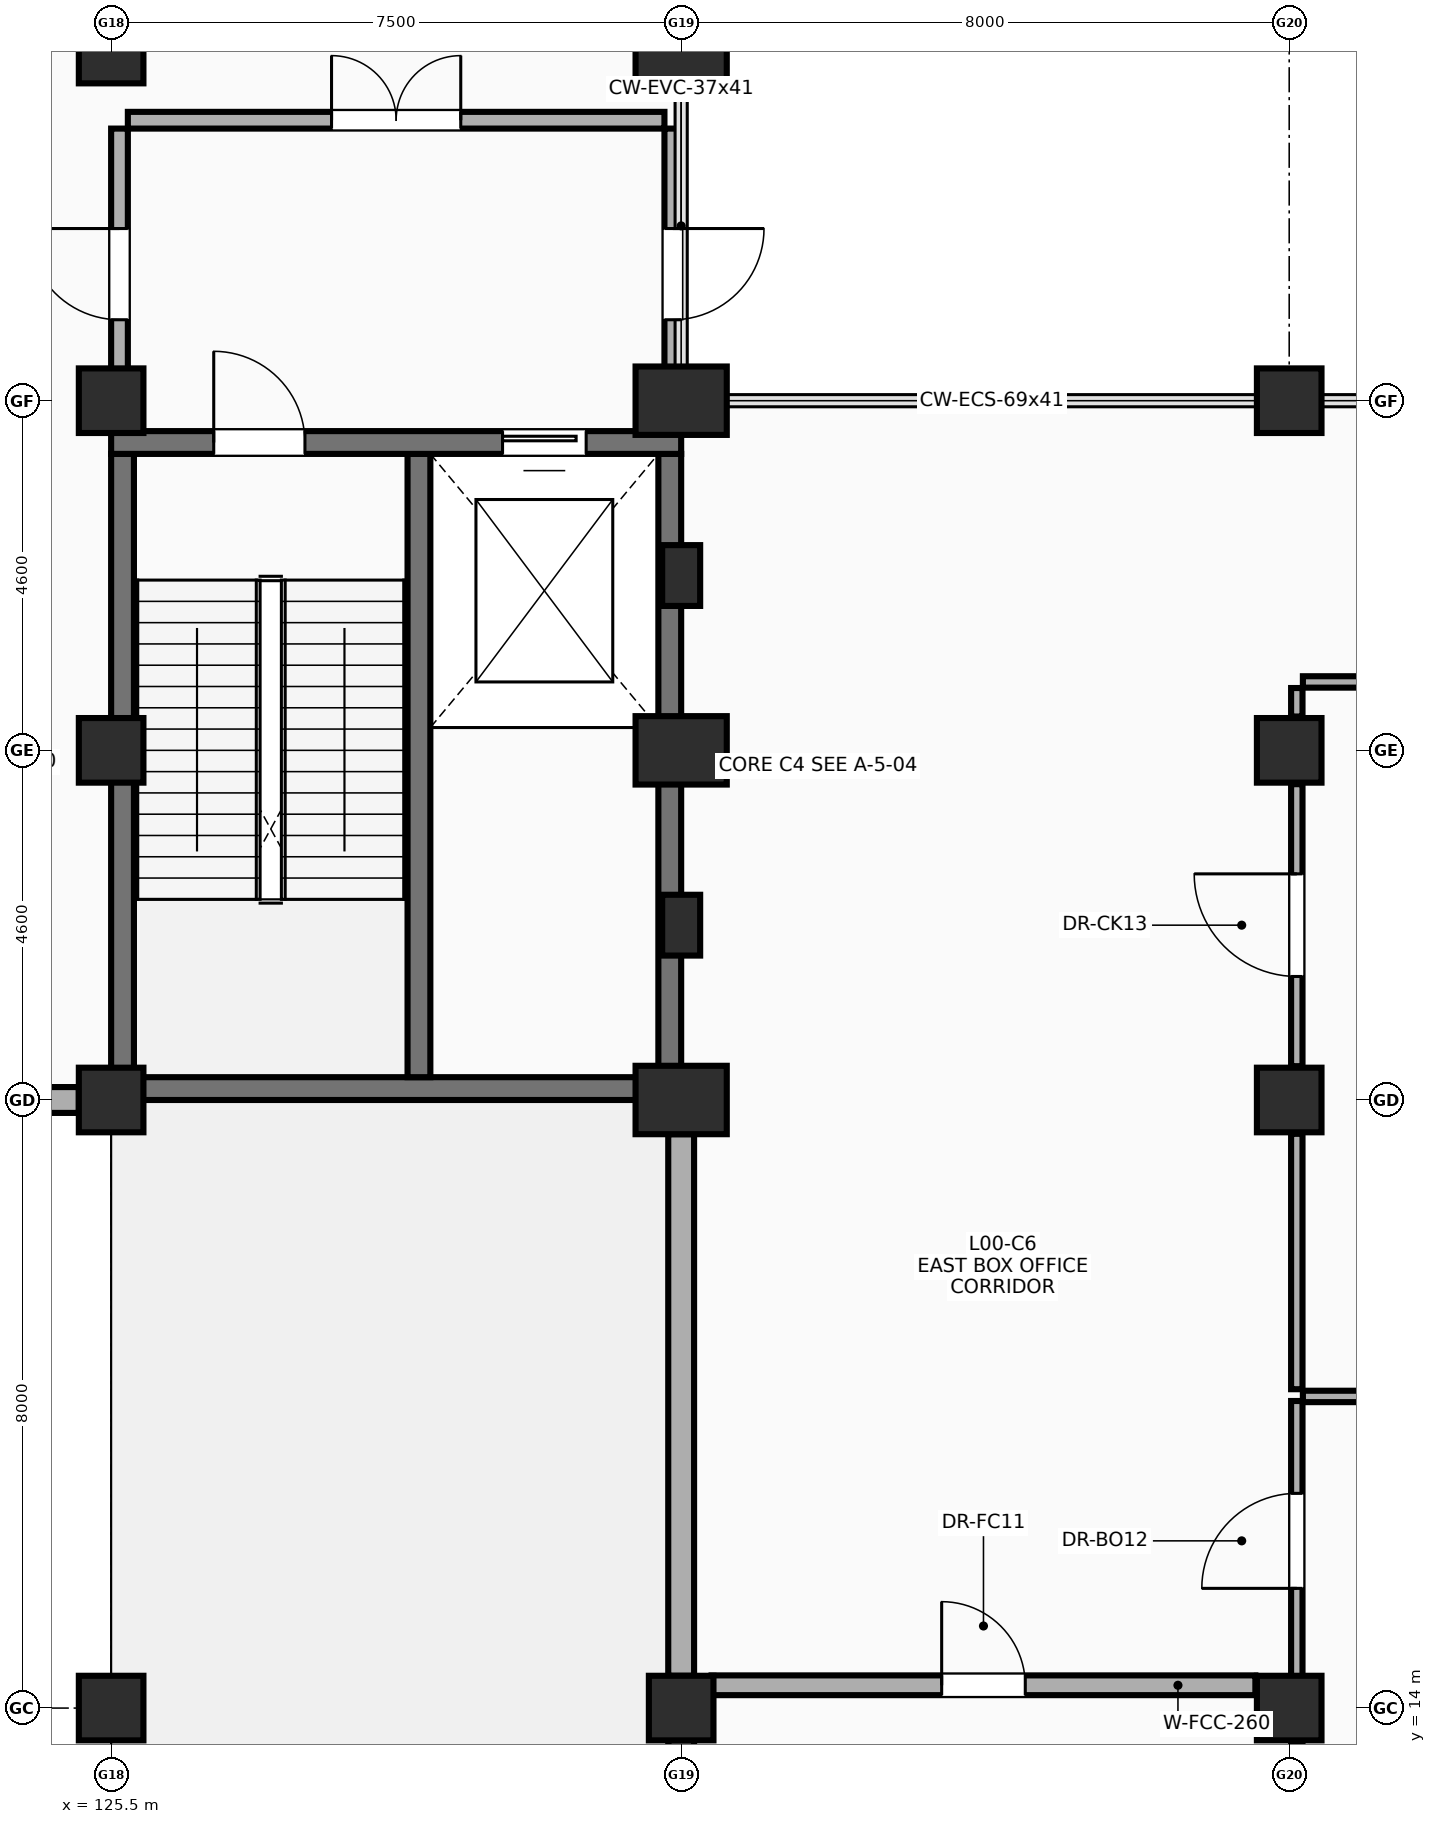
"""IFC4 building model, lengths in metres.
Left out: names, types, materials, properties, quantities, classifications, styles, units other than length and angle.
Written with IfcOpenShell. Run it as: python <this file> out.ifc"""

import sys

from ifc_helpers import new_model, si_unit, direction, frame, frame_2d, origin, origin_2d, place, context, subcontext, project, spatial, rectangle, circle, extrude, element, fill, save


model = new_model("IFC4")
c1 = context("Model", 3, precision=1e-05, world=origin(), true_north=direction((0.0, 1.0)))
c2 = subcontext(c1, "Body", "Model", "MODEL_VIEW")
j1 = project(units=[si_unit("LENGTHUNIT", "METRE"), si_unit("PLANEANGLEUNIT", "RADIAN")], contexts=[c1])
p1 = place(None, origin())
s1 = spatial("IfcSite", under=j1, at=p1, CompositionType="ELEMENT")
p2 = place(p1, origin())
s2 = spatial("IfcBuilding", under=s1, at=p2, CompositionType="ELEMENT")
p3 = place(p2, origin())
s3 = spatial("IfcBuildingStorey", under=s2, at=p3, CompositionType="ELEMENT", Elevation=0.0)
p4 = place(p3, frame((125.5, 14.0, 0.0), z_axis=(0.0, 0.0, 1.0), x_axis=(1.0, 0.0, 0.0)))
e1 = element("IfcColumn", 1, at=p4, inside=s3, PredefinedType="COLUMN", context=c2, shape_type="SweptSolid", body=[
    extrude(circle(Radius=0.425, at=origin_2d()), origin(), (0.0, 0.0, 1.0), 5.4),
])
for number, where, z_axis, x_axis in (
    (2, (125.5, 22.0, 0.0), (0.0, 0.0, 1.0), (1.0, 0.0, 0.0)),
    (3, (125.5, 26.6, 0.0), (0.0, 0.0, 1.0), (1.0, 0.0, 0.0)),
    (4, (125.5, 31.2, 0.0), (0.0, 0.0, 1.0), (1.0, 0.0, 0.0)),
    (5, (125.5, 35.8, 0.0), (0.0, 0.0, 1.0), (1.0, 0.0, 0.0)),
    (6, (133.0, 14.0, 0.0), (0.0, 0.0, 1.0), (1.0, 0.0, 0.0)),
):
    element("IfcColumn", number, at=place(p3, frame(where, z_axis=z_axis, x_axis=x_axis)), inside=s3, PredefinedType="COLUMN", context=c2, shape_type="SweptSolid", body=[
        extrude(rectangle(XDim=0.85, YDim=0.85, at=origin_2d()), origin(), (0.0, 0.0, 1.0), 5.4),
    ])
for number, where, z_axis, x_axis in (
    (7, (133.0, 22.0, 0.0), (0.0, 0.0, 1.0), (1.0, 0.0, 0.0)),
    (8, (133.0, 26.6, 0.0), (0.0, 0.0, 1.0), (1.0, 0.0, 0.0)),
    (9, (133.0, 31.2, 0.0), (0.0, 0.0, 1.0), (1.0, 0.0, 0.0)),
    (10, (133.0, 35.8, 0.0), (0.0, 0.0, 1.0), (1.0, 0.0, 0.0)),
):
    element("IfcColumn", number, at=place(p3, frame(where, z_axis=z_axis, x_axis=x_axis)), inside=s3, PredefinedType="COLUMN", context=c2, shape_type="SweptSolid", body=[
        extrude(rectangle(XDim=1.2, YDim=0.9, at=origin_2d()), origin(), (0.0, 0.0, 1.0), 5.4),
    ])
for number, where, z_axis, x_axis in (
    (11, (141.0, 14.0, 0.0), (0.0, 0.0, 1.0), (1.0, 0.0, 0.0)),
    (12, (141.0, 22.0, 0.0), (0.0, 0.0, 1.0), (1.0, 0.0, 0.0)),
    (13, (141.0, 26.6, 0.0), (0.0, 0.0, 1.0), (1.0, 0.0, 0.0)),
    (14, (141.0, 31.2, 0.0), (0.0, 0.0, 1.0), (1.0, 0.0, 0.0)),
):
    element("IfcColumn", number, at=place(p3, frame(where, z_axis=z_axis, x_axis=x_axis)), inside=s3, PredefinedType="COLUMN", context=c2, shape_type="SweptSolid", body=[
        extrude(rectangle(XDim=0.85, YDim=0.85, at=origin_2d()), origin(), (0.0, 0.0, 1.0), 5.4),
    ])
for number, where, z_axis, x_axis in (
    (15, (133.0, 24.3, 0.0), (0.0, 0.0, 1.0), (1.0, 0.0, 0.0)),
    (16, (133.0, 28.9, 0.0), (0.0, 0.0, 1.0), (1.0, 0.0, 0.0)),
):
    element("IfcColumn", number, at=place(p3, frame(where, z_axis=z_axis, x_axis=x_axis)), inside=s3, PredefinedType="PILASTER", context=c2, shape_type="SweptSolid", body=[
        extrude(rectangle(XDim=0.5, YDim=0.8, at=origin_2d()), origin(), (0.0, 0.0, 1.0), 5.4),
    ])
p5 = place(p3, frame((125.5, 22.15, 0.0), z_axis=(0.0, 0.0, 1.0), x_axis=(1.0, 0.0, 0.0)))
e17 = element("IfcWall", 17, at=p5, inside=s3, PredefinedType="SHEAR", context=c2, shape_type="SweptSolid", body=[
    extrude(rectangle(XDim=7.5, YDim=0.3, at=frame_2d((3.75, 0.0))), origin(), (0.0, 0.0, 1.0), 5.4),
])
for number, where, z_axis, x_axis in (
    (18, (125.65, 22.3, 0.0), (0.0, 0.0, 1.0), (0.0, 1.0, 0.0)),
    (19, (132.85, 22.3, 0.0), (0.0, 0.0, 1.0), (0.0, 1.0, 0.0)),
    (20, (129.55, 22.3, 0.0), (0.0, 0.0, 1.0), (0.0, 1.0, 0.0)),
):
    element("IfcWall", number, at=place(p3, frame(where, z_axis=z_axis, x_axis=x_axis)), inside=s3, PredefinedType="SHEAR", context=c2, shape_type="SweptSolid", body=[
        extrude(rectangle(XDim=8.2, YDim=0.3, at=frame_2d((4.1, 0.0))), origin(), (0.0, 0.0, 1.0), 5.4),
    ])
p6 = place(p3, frame((133.0, 6.425, 0.0), z_axis=(0.0, 0.0, 1.0), x_axis=(0.0, 1.0, 0.0)))
e21 = element("IfcWall", 21, at=p6, inside=s3, PredefinedType="SOLIDWALL", context=c2, shape_type="SweptSolid", body=[
    extrude(rectangle(XDim=7.15, YDim=0.34, at=frame_2d((3.575, 0.0))), origin(), (0.0, 0.0, 1.0), 4.15),
])
p7 = place(p3, frame((133.0, 14.425, 0.0), z_axis=(0.0, 0.0, 1.0), x_axis=(0.0, 1.0, 0.0)))
e22 = element("IfcWall", 22, at=p7, inside=s3, PredefinedType="SOLIDWALL", context=c2, shape_type="SweptSolid", body=[
    extrude(rectangle(XDim=7.125, YDim=0.34, at=frame_2d((3.562, 0.0))), origin(), (0.0, 0.0, 1.0), 4.15),
])
p8 = place(p3, frame((125.5, 30.65, 0.0), z_axis=(0.0, 0.0, 1.0), x_axis=(1.0, 0.0, 0.0)))
e23 = element("IfcWall", 23, at=p8, inside=s3, PredefinedType="SHEAR", context=c2, shape_type="SweptSolid", body=[
    extrude(rectangle(XDim=7.5, YDim=0.3, at=frame_2d((3.75, 0.0))), origin(), (0.0, 0.0, 1.0), 5.4),
])
p9 = place(p8, frame((1.35, 0.0, 0.0)))
e24 = element("IfcOpeningElement", 24, at=p9, cuts=e23, PredefinedType="OPENING", context=c2, shape_type="SweptSolid", body=[
    extrude(rectangle(XDim=1.2, YDim=2.15, at=frame_2d((0.6, 1.075))), frame((0.0, 0.16, 0.0), z_axis=(0.0, -1.0, 0.0), x_axis=(1.0, 0.0, 0.0)), (0.0, 0.0, 1.0), 0.32),
])
p10 = place(p8, frame((5.15, 0.0, 0.0)))
e25 = element("IfcOpeningElement", 25, at=p10, cuts=e23, PredefinedType="OPENING", context=c2, shape_type="SweptSolid", body=[
    extrude(rectangle(XDim=1.1, YDim=2.15, at=frame_2d((0.55, 1.075))), frame((0.0, 0.16, 0.0), z_axis=(0.0, -1.0, 0.0), x_axis=(1.0, 0.0, 0.0)), (0.0, 0.0, 1.0), 0.32),
])
p11 = place(p3, frame((125.72, 34.89, 0.0), z_axis=(0.0, 0.0, 1.0), x_axis=(1.0, 0.0, 0.0)))
e26 = element("IfcWall", 26, at=p11, inside=s3, PredefinedType="SOLIDWALL", context=c2, shape_type="SweptSolid", body=[
    extrude(rectangle(XDim=7.06, YDim=0.22, at=frame_2d((3.53, 0.0))), origin(), (0.0, 0.0, 1.0), 4.4),
])
p12 = place(p11, frame((2.68, 0.0, 0.0)))
e27 = element("IfcOpeningElement", 27, at=p12, cuts=e26, PredefinedType="OPENING", context=c2, shape_type="SweptSolid", body=[
    extrude(rectangle(XDim=1.7, YDim=2.18, at=frame_2d((0.85, 1.09))), frame((0.0, 0.12, 0.0), z_axis=(0.0, -1.0, 0.0), x_axis=(1.0, 0.0, 0.0)), (0.0, 0.0, 1.0), 0.24),
])
p13 = place(p3, frame((125.61, 30.95, 0.0), z_axis=(0.0, 0.0, 1.0), x_axis=(0.0, 1.0, 0.0)))
e28 = element("IfcWall", 28, at=p13, inside=s3, PredefinedType="SOLIDWALL", context=c2, shape_type="SweptSolid", body=[
    extrude(rectangle(XDim=3.83, YDim=0.22, at=frame_2d((1.915, 0.0))), origin(), (0.0, 0.0, 1.0), 4.2),
])
p14 = place(p13, frame((1.315, 0.0, 0.0)))
e29 = element("IfcOpeningElement", 29, at=p14, cuts=e28, PredefinedType="OPENING", context=c2, shape_type="SweptSolid", body=[
    extrude(rectangle(XDim=1.2, YDim=2.15, at=frame_2d((0.6, 1.075))), frame((0.0, 0.12, 0.0), z_axis=(0.0, -1.0, 0.0), x_axis=(1.0, 0.0, 0.0)), (0.0, 0.0, 1.0), 0.24),
])
p15 = place(p3, frame((132.89, 30.95, 0.0), z_axis=(0.0, 0.0, 1.0), x_axis=(0.0, 1.0, 0.0)))
e30 = element("IfcWall", 30, at=p15, inside=s3, PredefinedType="SOLIDWALL", context=c2, shape_type="SweptSolid", body=[
    extrude(rectangle(XDim=3.83, YDim=0.22, at=frame_2d((1.915, 0.0))), origin(), (0.0, 0.0, 1.0), 4.4),
])
p16 = place(p15, frame((2.515, 0.0, 0.0), z_axis=(0.0, 0.0, 1.0), x_axis=(-1.0, 0.0, 0.0)))
e31 = element("IfcOpeningElement", 31, at=p16, cuts=e30, PredefinedType="OPENING", context=c2, shape_type="SweptSolid", body=[
    extrude(rectangle(XDim=1.2, YDim=2.15, at=frame_2d((0.6, 1.075))), frame((0.0, 0.12, 0.0), z_axis=(0.0, -1.0, 0.0), x_axis=(1.0, 0.0, 0.0)), (0.0, 0.0, 1.0), 0.24),
])
p17 = place(p3, frame((141.18, 18.1, 0.0), z_axis=(0.0, 0.0, 1.0), x_axis=(1.0, 0.0, 0.0)))
e32 = element("IfcWall", 32, at=p17, inside=s3, PredefinedType="PARTITIONING", context=c2, shape_type="SweptSolid", body=[
    extrude(rectangle(XDim=15.82, YDim=0.15, at=frame_2d((7.91, 0.0))), origin(), (0.0, 0.0, 1.0), 3.9),
])
p18 = place(p3, frame((141.1, 6.4, 0.0), z_axis=(0.0, 0.0, 1.0), x_axis=(0.0, 1.0, 0.0)))
e33 = element("IfcWall", 33, at=p18, inside=s3, PredefinedType="PARTITIONING", context=c2, shape_type="SweptSolid", body=[
    extrude(rectangle(XDim=7.155, YDim=0.15, at=frame_2d((3.578, 0.0))), origin(), (0.0, 0.0, 1.0), 4.2),
])
p19 = place(p3, frame((141.1, 14.4, 0.0), z_axis=(0.0, 0.0, 1.0), x_axis=(0.0, 1.0, 0.0)))
e34 = element("IfcWall", 34, at=p19, inside=s3, PredefinedType="PARTITIONING", context=c2, shape_type="SweptSolid", body=[
    extrude(rectangle(XDim=3.64, YDim=0.15, at=frame_2d((1.82, 0.0))), origin(), (0.0, 0.0, 1.0), 4.2),
])
p20 = place(p19, frame((1.175, 0.0, 0.0)))
e35 = element("IfcOpeningElement", 35, at=p20, cuts=e34, PredefinedType="OPENING", context=c2, shape_type="SweptSolid", body=[
    extrude(rectangle(XDim=1.25, YDim=2.15, at=frame_2d((0.625, 1.075))), frame((0.0, 0.085, 0.0), z_axis=(0.0, -1.0, 0.0), x_axis=(1.0, 0.0, 0.0)), (0.0, 0.0, 1.0), 0.17),
])
p21 = place(p3, frame((141.1, 22.445, 0.0), z_axis=(0.0, 0.0, 1.0), x_axis=(0.0, 1.0, 0.0)))
e36 = element("IfcWall", 36, at=p21, inside=s3, PredefinedType="PARTITIONING", context=c2, shape_type="SweptSolid", body=[
    extrude(rectangle(XDim=3.71, YDim=0.15, at=frame_2d((1.855, 0.0))), origin(), (0.0, 0.0, 1.0), 4.4),
])
p22 = place(p21, frame((1.18, 0.0, 0.0)))
e37 = element("IfcOpeningElement", 37, at=p22, cuts=e36, PredefinedType="OPENING", context=c2, shape_type="SweptSolid", body=[
    extrude(rectangle(XDim=1.35, YDim=2.15, at=frame_2d((0.675, 1.075))), frame((0.0, 0.085, 0.0), z_axis=(0.0, -1.0, 0.0), x_axis=(1.0, 0.0, 0.0)), (0.0, 0.0, 1.0), 0.17),
])
p23 = place(p3, frame((141.1, 27.045, 0.0), z_axis=(0.0, 0.0, 1.0), x_axis=(0.0, 1.0, 0.0)))
e38 = element("IfcWall", 38, at=p23, inside=s3, PredefinedType="PARTITIONING", context=c2, shape_type="SweptSolid", body=[
    extrude(rectangle(XDim=0.375, YDim=0.15, at=frame_2d((0.188, 0.0))), origin(), (0.0, 0.0, 1.0), 4.4),
])
p24 = place(p3, frame((141.18, 27.5, 0.0), z_axis=(0.0, 0.0, 1.0), x_axis=(1.0, 0.0, 0.0)))
e39 = element("IfcWall", 39, at=p24, inside=s3, PredefinedType="PARTITIONING", context=c2, shape_type="SweptSolid", body=[
    extrude(rectangle(XDim=15.84, YDim=0.15, at=frame_2d((7.92, 0.0))), origin(), (0.0, 0.0, 1.0), 4.4),
])
p25 = place(p24, frame((6.245, 0.0, 0.0)))
e40 = element("IfcOpeningElement", 40, at=p25, cuts=e39, PredefinedType="OPENING", context=c2, shape_type="SweptSolid", body=[
    extrude(rectangle(XDim=1.35, YDim=2.15, at=frame_2d((0.675, 1.075))), frame((0.0, 0.085, 0.0), z_axis=(0.0, -1.0, 0.0), x_axis=(1.0, 0.0, 0.0)), (0.0, 0.0, 1.0), 0.17),
])
p26 = place(p3, frame((133.4, 14.3, 0.0), z_axis=(0.0, 0.0, 1.0), x_axis=(1.0, 0.0, 0.0)))
e41 = element("IfcWall", 41, at=p26, inside=s3, PredefinedType="SOLIDWALL", context=c2, shape_type="SweptSolid", body=[
    extrude(rectangle(XDim=7.155, YDim=0.26, at=frame_2d((3.578, 0.0))), origin(), (0.0, 0.0, 1.0), 4.2),
])
p27 = place(p26, frame((3.028, 0.0, 0.0)))
e42 = element("IfcOpeningElement", 42, at=p27, cuts=e41, PredefinedType="OPENING", context=c2, shape_type="SweptSolid", body=[
    extrude(rectangle(XDim=1.1, YDim=2.18, at=frame_2d((0.55, 1.09))), frame((0.0, 0.14, 0.0), z_axis=(0.0, -1.0, 0.0), x_axis=(1.0, 0.0, 0.0)), (0.0, 0.0, 1.0), 0.28),
])
p28 = place(p3, frame((124.22, 22.0, 0.0), z_axis=(0.0, 0.0, 1.0), x_axis=(1.0, 0.0, 0.0)))
e43 = element("IfcWall", 43, at=p28, inside=s3, PredefinedType="SOLIDWALL", context=c2, shape_type="SweptSolid", body=[
    extrude(rectangle(XDim=0.855, YDim=0.34, at=frame_2d((0.427, 0.0))), origin(), (0.0, 0.0, 1.0), 4.15),
])
p29 = place(p3, frame((141.1, 18.195, 0.0), z_axis=(0.0, 0.0, 1.0), x_axis=(0.0, 1.0, 0.0)))
e44 = element("IfcWall", 44, at=p29, inside=s3, PredefinedType="PARTITIONING", context=c2, shape_type="SweptSolid", body=[
    extrude(rectangle(XDim=3.36, YDim=0.15, at=frame_2d((1.68, 0.0))), origin(), (0.0, 0.0, 1.0), 4.2),
])
p30 = place(p9, origin())
e45 = element("IfcDoor", 45, at=p30, inside=s3, OperationType="SINGLE_SWING_LEFT", PredefinedType="DOOR", context=c2, shape_type="SweptSolid", body=[
    extrude(rectangle(XDim=1.2, YDim=2.15, at=frame_2d((0.6, 1.075))), frame((0.0, 0.025, 0.0), z_axis=(0.0, -1.0, 0.0), x_axis=(1.0, 0.0, 0.0)), (0.0, 0.0, 1.0), 0.05),
])
fill(e24, e45)
p31 = place(p10, origin())
e46 = element("IfcDoor", 46, at=p31, inside=s3, OperationType="SLIDING_TO_LEFT", PredefinedType="DOOR", context=c2, shape_type="SweptSolid", body=[
    extrude(rectangle(XDim=1.1, YDim=2.15, at=frame_2d((0.55, 1.075))), frame((0.0, 0.025, 0.0), z_axis=(0.0, -1.0, 0.0), x_axis=(1.0, 0.0, 0.0)), (0.0, 0.0, 1.0), 0.05),
])
fill(e25, e46)
p32 = place(p12, origin())
e47 = element("IfcDoor", 47, at=p32, inside=s3, OperationType="DOUBLE_DOOR_SINGLE_SWING", PredefinedType="DOOR", context=c2, shape_type="SweptSolid", body=[
    extrude(rectangle(XDim=1.7, YDim=2.18, at=frame_2d((0.85, 1.09))), frame((0.0, 0.025, 0.0), z_axis=(0.0, -1.0, 0.0), x_axis=(1.0, 0.0, 0.0)), (0.0, 0.0, 1.0), 0.05),
])
fill(e27, e47)
p33 = place(p14, origin())
e48 = element("IfcDoor", 48, at=p33, inside=s3, OperationType="SINGLE_SWING_RIGHT", PredefinedType="DOOR", context=c2, shape_type="SweptSolid", body=[
    extrude(rectangle(XDim=1.2, YDim=2.15, at=frame_2d((0.6, 1.075))), frame((0.0, 0.025, 0.0), z_axis=(0.0, -1.0, 0.0), x_axis=(1.0, 0.0, 0.0)), (0.0, 0.0, 1.0), 0.05),
])
fill(e29, e48)
p34 = place(p16, origin())
e49 = element("IfcDoor", 49, at=p34, inside=s3, OperationType="SINGLE_SWING_LEFT", PredefinedType="DOOR", context=c2, shape_type="SweptSolid", body=[
    extrude(rectangle(XDim=1.2, YDim=2.15, at=frame_2d((0.6, 1.075))), frame((0.0, 0.025, 0.0), z_axis=(0.0, -1.0, 0.0), x_axis=(1.0, 0.0, 0.0)), (0.0, 0.0, 1.0), 0.05),
])
fill(e31, e49)
p35 = place(p20, origin())
e50 = element("IfcDoor", 50, at=p35, inside=s3, OperationType="SINGLE_SWING_LEFT", PredefinedType="DOOR", context=c2, shape_type="SweptSolid", body=[
    extrude(rectangle(XDim=1.25, YDim=2.15, at=frame_2d((0.625, 1.075))), frame((0.0, 0.025, 0.0), z_axis=(0.0, -1.0, 0.0), x_axis=(1.0, 0.0, 0.0)), (0.0, 0.0, 1.0), 0.05),
])
fill(e35, e50)
p36 = place(p22, origin())
e51 = element("IfcDoor", 51, at=p36, inside=s3, OperationType="SINGLE_SWING_RIGHT", PredefinedType="DOOR", context=c2, shape_type="SweptSolid", body=[
    extrude(rectangle(XDim=1.35, YDim=2.15, at=frame_2d((0.675, 1.075))), frame((0.0, 0.025, 0.0), z_axis=(0.0, -1.0, 0.0), x_axis=(1.0, 0.0, 0.0)), (0.0, 0.0, 1.0), 0.05),
])
fill(e37, e51)
p37 = place(p27, origin())
e52 = element("IfcDoor", 52, at=p37, inside=s3, OperationType="SINGLE_SWING_LEFT", PredefinedType="DOOR", context=c2, shape_type="SweptSolid", body=[
    extrude(rectangle(XDim=1.1, YDim=2.18, at=frame_2d((0.55, 1.09))), frame((0.0, 0.025, 0.0), z_axis=(0.0, -1.0, 0.0), x_axis=(1.0, 0.0, 0.0)), (0.0, 0.0, 1.0), 0.05),
])
fill(e42, e52)
save(model, sys.argv[1])
